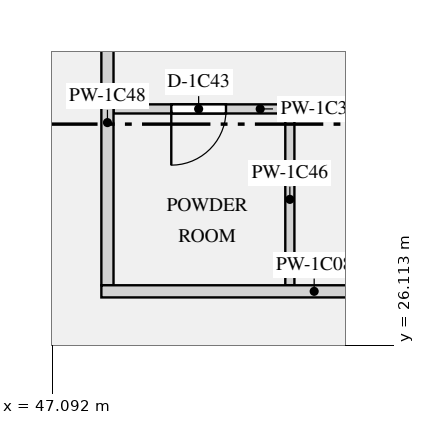
"""IFC4 building model, lengths in metres.
Left out: names, types, materials, properties, quantities, classifications, styles, units other than length and angle.
Written with IfcOpenShell. Run it as: python <this file> out.ifc"""

import sys

from ifc_helpers import new_model, si_unit, direction, frame, frame_2d, origin, place, context, subcontext, project, spatial, rectangle, extrude, element, fill, save


model = new_model("IFC4")
c1 = context("Model", 3, precision=1e-05, world=origin(), true_north=direction((0.0, 1.0)))
c2 = subcontext(c1, "Body", "Model", "MODEL_VIEW")
j1 = project(units=[si_unit("LENGTHUNIT", "METRE"), si_unit("PLANEANGLEUNIT", "RADIAN")], contexts=[c1])
p1 = place(None, origin())
s1 = spatial("IfcSite", under=j1, at=p1, CompositionType="ELEMENT")
p2 = place(p1, origin())
s2 = spatial("IfcBuilding", under=s1, at=p2, CompositionType="ELEMENT")
p3 = place(p2, frame((0.0, 0.0, 38.4)))
s3 = spatial("IfcBuildingStorey", under=s2, at=p3, CompositionType="ELEMENT", Elevation=38.4)
p4 = place(p3, frame((47.9, 27.0, 0.0), z_axis=(0.0, 0.0, 1.0), x_axis=(1.0, 0.0, 0.0)))
e1 = element("IfcWall", 1, at=p4, inside=s3, PredefinedType="PARTITIONING", context=c2, shape_type="SweptSolid", body=[
    extrude(rectangle(XDim=7.0, YDim=0.2, at=frame_2d((3.5, 0.0))), origin(), (0.0, 0.0, 1.0), 2.83),
])
p5 = place(p3, frame((48.1, 30.0, 0.0), z_axis=(0.0, 0.0, 1.0), x_axis=(1.0, 0.0, 0.0)))
e2 = element("IfcWall", 2, at=p5, inside=s3, PredefinedType="PARTITIONING", context=c2, shape_type="SweptSolid", body=[
    extrude(rectangle(XDim=2.975, YDim=0.15, at=frame_2d((1.487, 0.0))), origin(), (0.0, 0.0, 1.0), 2.83),
])
p6 = place(p5, frame((0.95, 0.0, 0.0)))
e3 = element("IfcOpeningElement", 3, at=p6, cuts=e2, PredefinedType="OPENING", context=c2, shape_type="SweptSolid", body=[
    extrude(rectangle(XDim=0.9, YDim=2.1, at=frame_2d((0.45, 1.05))), frame((0.0, 0.085, 0.0), z_axis=(0.0, -1.0, 0.0), x_axis=(1.0, 0.0, 0.0)), (0.0, 0.0, 1.0), 0.17),
])
p7 = place(p3, frame((51.0, 27.1, 0.0), z_axis=(0.0, 0.0, 1.0), x_axis=(0.0, 1.0, 0.0)))
e4 = element("IfcWall", 4, at=p7, inside=s3, PredefinedType="PARTITIONING", context=c2, shape_type="SweptSolid", body=[
    extrude(rectangle(XDim=2.825, YDim=0.15, at=frame_2d((1.413, 0.0))), origin(), (0.0, 0.0, 1.0), 2.83),
])
p8 = place(p3, frame((48.0, 27.1, 0.0), z_axis=(0.0, 0.0, 1.0), x_axis=(0.0, 1.0, 0.0)))
e5 = element("IfcWall", 5, at=p8, inside=s3, PredefinedType="PARTITIONING", context=c2, shape_type="SweptSolid", body=[
    extrude(rectangle(XDim=11.325, YDim=0.2, at=frame_2d((5.663, 0.0))), origin(), (0.0, 0.0, 1.0), 2.83),
])
p9 = place(p8, frame((5.35, 0.0, 0.0)))
e6 = element("IfcOpeningElement", 6, at=p9, cuts=e5, PredefinedType="OPENING", context=c2, shape_type="SweptSolid", body=[
    extrude(rectangle(XDim=1.1, YDim=2.1, at=frame_2d((0.55, 1.05))), frame((0.0, 0.11, 0.0), z_axis=(0.0, -1.0, 0.0), x_axis=(1.0, 0.0, 0.0)), (0.0, 0.0, 1.0), 0.22),
])
p10 = place(p6, frame((0.9, 0.0, 0.0), z_axis=(0.0, 0.0, 1.0), x_axis=(-1.0, 0.0, 0.0)))
e7 = element("IfcDoor", 7, at=p10, inside=s3, OperationType="SINGLE_SWING_RIGHT", PredefinedType="DOOR", context=c2, shape_type="SweptSolid", body=[
    extrude(rectangle(XDim=0.9, YDim=2.1, at=frame_2d((0.45, 1.05))), frame((0.0, 0.025, 0.0), z_axis=(0.0, -1.0, 0.0), x_axis=(1.0, 0.0, 0.0)), (0.0, 0.0, 1.0), 0.05),
])
fill(e3, e7)
save(model, sys.argv[1])
